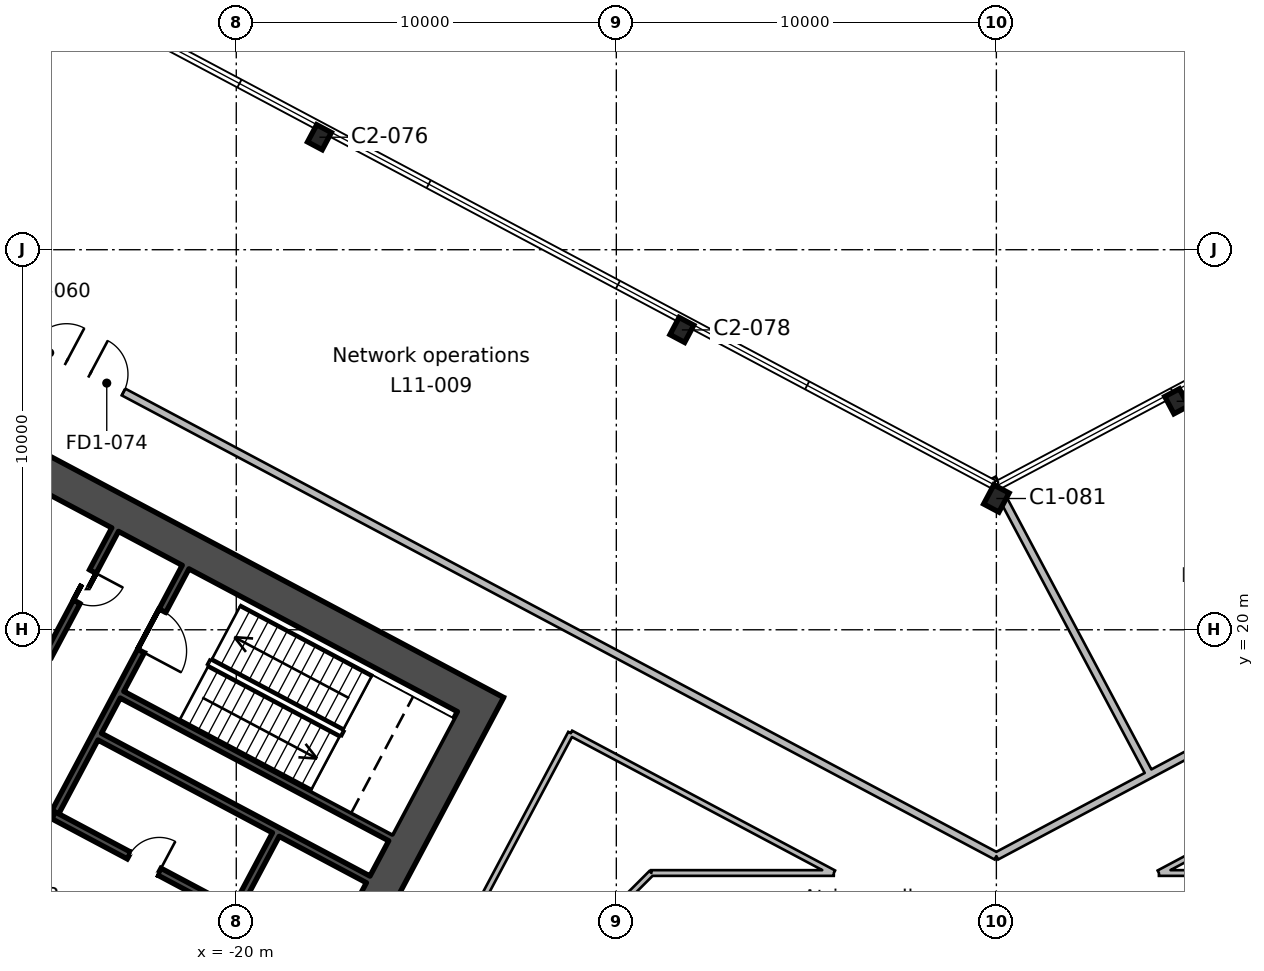
"""IFC4 building model, lengths in metres.
Left out: names, types, materials, properties, quantities, classifications, styles, units other than length and angle.
Written with IfcOpenShell. Run it as: python <this file> out.ifc"""

import sys

from ifc_helpers import new_model, si_unit, direction, frame, frame_2d, origin, origin_2d, place, context, subcontext, project, spatial, rectangle, i_section, extrude, element, fill, save


model = new_model("IFC4")
c1 = context("Model", 3, precision=1e-05, world=origin(), true_north=direction((0.0, 1.0)))
c2 = subcontext(c1, "Body", "Model", "MODEL_VIEW")
j1 = project(units=[si_unit("LENGTHUNIT", "METRE"), si_unit("PLANEANGLEUNIT", "RADIAN")], contexts=[c1])
p1 = place(None, origin())
s1 = spatial("IfcSite", under=j1, at=p1, CompositionType="ELEMENT")
p2 = place(p1, origin())
s2 = spatial("IfcBuilding", under=s1, at=p2, CompositionType="ELEMENT")
p3 = place(p2, frame((0.0, 0.0, 60.8)))
s3 = spatial("IfcBuildingStorey", under=s2, at=p3, CompositionType="ELEMENT", Elevation=60.8)
p4 = place(p3, frame((0.0, 23.454, 0.0), z_axis=(0.0, 0.0, 1.0), x_axis=(-0.882947592859, 0.469471562786, 0.0)))
e1 = element("IfcColumn", 1, at=p4, inside=s3, PredefinedType="COLUMN", context=c2, shape_type="SweptSolid", body=[
    extrude(i_section(OverallWidth=0.455, OverallDepth=0.569, WebThickness=0.078, FlangeThickness=0.125, FilletRadius=0.015, at=origin_2d()), origin(), (0.0, 0.0, 1.0), 5.4),
])
for number, where, z_axis, x_axis in (
    (2, (4.744, 26.012, 0.0), (0.0, 0.0, 1.0), (-0.883, -0.469, 0.0)),
    (3, (-8.275, 27.89, 0.0), (0.0, 0.0, 1.0), (-0.883, 0.469, 0.0)),
    (4, (-17.811, 32.96, 0.0), (0.0, 0.0, 1.0), (-0.883, 0.469, 0.0)),
):
    element("IfcColumn", number, at=place(p3, frame(where, z_axis=z_axis, x_axis=x_axis)), inside=s3, PredefinedType="COLUMN", context=c2, shape_type="SweptSolid", body=[
        extrude(i_section(OverallWidth=0.437, OverallDepth=0.513, WebThickness=0.061, FlangeThickness=0.097, FilletRadius=0.015, at=origin_2d()), origin(), (0.0, 0.0, 1.0), 5.4),
    ])
p5 = place(p3, frame((-13.362, 18.43, 0.0), z_axis=(0.0, 0.0, 1.0), x_axis=(-0.46947084998, -0.882947971864, 0.0)))
e5 = element("IfcWall", 5, at=p5, inside=s3, PredefinedType="SHEAR", context=c2, shape_type="SweptSolid", body=[
    extrude(rectangle(XDim=20.0, YDim=0.9, at=frame_2d((10.0, 0.0))), origin(), (0.0, 0.0, 1.0), 5.4),
])
p6 = place(p5, frame((7.0, 0.0, 0.0)))
e6 = element("IfcOpeningElement", 6, at=p6, cuts=e5, PredefinedType="OPENING", context=c2, shape_type="SweptSolid", body=[
    extrude(rectangle(XDim=2.4, YDim=2.4, at=frame_2d((1.2, 1.2))), frame((0.0, 0.46, 0.0), z_axis=(0.0, -1.0, 0.0), x_axis=(1.0, 0.0, 0.0)), (0.0, 0.0, 1.0), 0.92),
])
p7 = place(p3, frame((-13.97, 18.244, 0.0), z_axis=(0.0, 0.0, 1.0), x_axis=(-0.88294509198, 0.469476266226, 0.0)))
e7 = element("IfcWall", 7, at=p7, inside=s3, PredefinedType="SHEAR", context=c2, shape_type="SweptSolid", body=[
    extrude(rectangle(XDim=20.2, YDim=0.9, at=frame_2d((10.1, 0.0))), origin(), (0.0, 0.0, 1.0), 5.4),
])
p8 = place(p3, frame((-18.96, 14.611, 0.0), z_axis=(0.0, 0.0, 1.0), x_axis=(-0.4694473164, -0.882960484464, 0.0)))
e8 = element("IfcWall", 8, at=p8, inside=s3, PredefinedType="SHEAR", context=c2, shape_type="SweptSolid", body=[
    extrude(rectangle(XDim=2.2, YDim=0.2, at=frame_2d((1.1, 0.0))), origin(), (0.0, 0.0, 1.0), 5.4),
])
p9 = place(p3, frame((-21.333, 21.649, 0.0), z_axis=(0.0, 0.0, 1.0), x_axis=(-0.469494272526, -0.882935517501, 0.0)))
e9 = element("IfcWall", 9, at=p9, inside=s3, PredefinedType="SHEAR", context=c2, shape_type="SweptSolid", body=[
    extrude(rectangle(XDim=7.3, YDim=0.2, at=frame_2d((3.65, 0.0))), origin(), (0.0, 0.0, 1.0), 5.4),
])
p10 = place(p9, frame((1.3, 0.0, 0.0)))
e10 = element("IfcOpeningElement", 10, at=p10, cuts=e9, PredefinedType="OPENING", context=c2, shape_type="SweptSolid", body=[
    extrude(rectangle(XDim=1.2, YDim=2.1, at=frame_2d((0.6, 1.05))), frame((0.0, 0.11, 0.0), z_axis=(0.0, -1.0, 0.0), x_axis=(1.0, 0.0, 0.0)), (0.0, 0.0, 1.0), 0.22),
])
p11 = place(p3, frame((-23.188, 22.635, 0.0), z_axis=(0.0, 0.0, 1.0), x_axis=(-0.469454336211, -0.882956752176, 0.0)))
e11 = element("IfcWall", 11, at=p11, inside=s3, PredefinedType="SHEAR", context=c2, shape_type="SweptSolid", body=[
    extrude(rectangle(XDim=7.3, YDim=0.2, at=frame_2d((3.65, 0.0))), origin(), (0.0, 0.0, 1.0), 5.4),
])
p12 = place(p11, frame((1.25, 0.0, 0.0)))
e12 = element("IfcOpeningElement", 12, at=p12, cuts=e11, PredefinedType="OPENING", context=c2, shape_type="SweptSolid", body=[
    extrude(rectangle(XDim=0.9, YDim=2.1, at=frame_2d((0.45, 1.05))), frame((0.0, 0.11, 0.0), z_axis=(0.0, -1.0, 0.0), x_axis=(1.0, 0.0, 0.0)), (0.0, 0.0, 1.0), 0.22),
])
p13 = place(p11, frame((3.75, 0.0, 0.0)))
e13 = element("IfcOpeningElement", 13, at=p13, cuts=e11, PredefinedType="OPENING", context=c2, shape_type="SweptSolid", body=[
    extrude(rectangle(XDim=0.9, YDim=2.1, at=frame_2d((0.45, 1.05))), frame((0.0, 0.11, 0.0), z_axis=(0.0, -1.0, 0.0), x_axis=(1.0, 0.0, 0.0)), (0.0, 0.0, 1.0), 0.22),
])
p14 = place(p3, frame((-24.872, 19.68, 0.0), z_axis=(0.0, 0.0, 1.0), x_axis=(-0.882953967957, 0.469459572775, 0.0)))
e14 = element("IfcWall", 14, at=p14, inside=s3, PredefinedType="SOLIDWALL", context=c2, shape_type="SweptSolid", body=[
    extrude(rectangle(XDim=5.2, YDim=0.2, at=frame_2d((2.6, 0.0))), origin(), (0.0, 0.0, 1.0), 5.4),
])
p15 = place(p3, frame((-15.942, 14.536, 0.0), z_axis=(0.0, 0.0, 1.0), x_axis=(-0.882946947542, 0.469472776449, 0.0)))
e15 = element("IfcWall", 15, at=p15, inside=s3, PredefinedType="SHEAR", context=c2, shape_type="SweptSolid", body=[
    extrude(rectangle(XDim=8.0, YDim=0.2, at=frame_2d((4.0, 0.0))), origin(), (0.0, 0.0, 1.0), 5.4),
])
p16 = place(p3, frame((-16.529, 13.432, 0.0), z_axis=(0.0, 0.0, 1.0), x_axis=(-0.88295287151, 0.469461634952, 0.0)))
e16 = element("IfcWall", 16, at=p16, inside=s3, PredefinedType="SHEAR", context=c2, shape_type="SweptSolid", body=[
    extrude(rectangle(XDim=8.0, YDim=0.2, at=frame_2d((4.0, 0.0))), origin(), (0.0, 0.0, 1.0), 5.4),
])
p17 = place(p3, frame((-20.04, 12.581, 0.0), z_axis=(0.0, 0.0, 1.0), x_axis=(-0.882942972946, 0.469480251476, 0.0)))
e17 = element("IfcWall", 17, at=p17, inside=s3, PredefinedType="SHEAR", context=c2, shape_type="SweptSolid", body=[
    extrude(rectangle(XDim=5.4, YDim=0.2, at=frame_2d((2.7, 0.0))), origin(), (0.0, 0.0, 1.0), 5.4),
])
p18 = place(p17, frame((2.25, 0.0, 0.0)))
e18 = element("IfcOpeningElement", 18, at=p18, cuts=e17, PredefinedType="OPENING", context=c2, shape_type="SweptSolid", body=[
    extrude(rectangle(XDim=0.9, YDim=2.1, at=frame_2d((0.45, 1.05))), frame((0.0, 0.11, 0.0), z_axis=(0.0, -1.0, 0.0), x_axis=(1.0, 0.0, 0.0)), (0.0, 0.0, 1.0), 0.22),
])
p19 = place(p3, frame((-48.541, 39.854, 0.0), z_axis=(0.0, 0.0, 1.0), x_axis=(0.882945008423, -0.469476423372, 0.0)))
e19 = element("IfcWall", 19, at=p19, inside=s3, PredefinedType="PARTITIONING", context=c2, shape_type="SweptSolid", body=[
    extrude(rectangle(XDim=54.976, YDim=0.2, at=frame_2d((27.488, 0.0))), origin(), (0.0, 0.0, 1.0), 5.0),
])
p20 = place(p19, frame((27.965, 0.0, 0.0)))
e20 = element("IfcOpeningElement", 20, at=p20, cuts=e19, PredefinedType="OPENING", context=c2, shape_type="SweptSolid", body=[
    extrude(rectangle(XDim=1.0, YDim=2.1, at=frame_2d((0.5, 1.05))), frame((0.0, 0.11, 0.0), z_axis=(0.0, -1.0, 0.0), x_axis=(1.0, 0.0, 0.0)), (0.0, 0.0, 1.0), 0.22),
])
p21 = place(p19, frame((26.265, 0.0, 0.0)))
e21 = element("IfcOpeningElement", 21, at=p21, cuts=e19, PredefinedType="OPENING", context=c2, shape_type="SweptSolid", body=[
    extrude(rectangle(XDim=1.0, YDim=2.1, at=frame_2d((0.5, 1.05))), frame((0.0, 0.11, 0.0), z_axis=(0.0, -1.0, 0.0), x_axis=(1.0, 0.0, 0.0)), (0.0, 0.0, 1.0), 0.22),
])
p22 = place(p19, frame((15.365, 0.0, 0.0)))
e22 = element("IfcOpeningElement", 22, at=p22, cuts=e19, PredefinedType="OPENING", context=c2, shape_type="SweptSolid", body=[
    extrude(rectangle(XDim=1.0, YDim=2.1, at=frame_2d((0.5, 1.05))), frame((0.0, 0.11, 0.0), z_axis=(0.0, -1.0, 0.0), x_axis=(1.0, 0.0, 0.0)), (0.0, 0.0, 1.0), 0.22),
])
p23 = place(p3, frame((0.0, 14.044, 0.0), z_axis=(0.0, 0.0, 1.0), x_axis=(0.882943219941, 0.469479786955, 0.0)))
e23 = element("IfcWall", 23, at=p23, inside=s3, PredefinedType="PARTITIONING", context=c2, shape_type="SweptSolid", body=[
    extrude(rectangle(XDim=65.607, YDim=0.2, at=frame_2d((32.803, 0.0))), origin(), (0.0, 0.0, 1.0), 5.0),
])
p24 = place(p23, frame((35.55, 0.0, 0.0)))
e24 = element("IfcOpeningElement", 24, at=p24, cuts=e23, PredefinedType="OPENING", context=c2, shape_type="SweptSolid", body=[
    extrude(rectangle(XDim=1.0, YDim=2.1, at=frame_2d((0.5, 1.05))), frame((0.0, 0.11, 0.0), z_axis=(0.0, -1.0, 0.0), x_axis=(1.0, 0.0, 0.0)), (0.0, 0.0, 1.0), 0.22),
])
p25 = place(p23, frame((32.15, 0.0, 0.0)))
e25 = element("IfcOpeningElement", 25, at=p25, cuts=e23, PredefinedType="OPENING", context=c2, shape_type="SweptSolid", body=[
    extrude(rectangle(XDim=1.0, YDim=2.1, at=frame_2d((0.5, 1.05))), frame((0.0, 0.11, 0.0), z_axis=(0.0, -1.0, 0.0), x_axis=(1.0, 0.0, 0.0)), (0.0, 0.0, 1.0), 0.22),
])
p26 = place(p23, frame((29.75, 0.0, 0.0)))
e26 = element("IfcOpeningElement", 26, at=p26, cuts=e23, PredefinedType="OPENING", context=c2, shape_type="SweptSolid", body=[
    extrude(rectangle(XDim=1.0, YDim=2.1, at=frame_2d((0.5, 1.05))), frame((0.0, 0.11, 0.0), z_axis=(0.0, -1.0, 0.0), x_axis=(1.0, 0.0, 0.0)), (0.0, 0.0, 1.0), 0.22),
])
p27 = place(p23, frame((13.95, 0.0, 0.0)))
e27 = element("IfcOpeningElement", 27, at=p27, cuts=e23, PredefinedType="OPENING", context=c2, shape_type="SweptSolid", body=[
    extrude(rectangle(XDim=1.0, YDim=2.1, at=frame_2d((0.5, 1.05))), frame((0.0, 0.11, 0.0), z_axis=(0.0, -1.0, 0.0), x_axis=(1.0, 0.0, 0.0)), (0.0, 0.0, 1.0), 0.22),
])
p28 = place(p3, frame((-19.822, 34.55, 0.0), z_axis=(0.0, 0.0, 1.0), x_axis=(-0.469424316479, -0.882972712545, 0.0)))
e28 = element("IfcWall", 28, at=p28, inside=s3, PredefinedType="PARTITIONING", context=c2, shape_type="SweptSolid", body=[
    extrude(rectangle(XDim=8.8, YDim=0.2, at=frame_2d((4.4, 0.0))), origin(), (0.0, 0.0, 1.0), 5.0),
])
p29 = place(p3, frame((-0.105, 23.984, 0.0), z_axis=(0.0, 0.0, 1.0), x_axis=(0.469424872141, -0.882972417132, 0.0)))
e29 = element("IfcWall", 29, at=p29, inside=s3, PredefinedType="PARTITIONING", context=c2, shape_type="SweptSolid", body=[
    extrude(rectangle(XDim=8.826, YDim=0.2, at=frame_2d((4.413, 0.0))), origin(), (0.0, 0.0, 1.0), 5.0),
])
p30 = place(p3, frame((-20.588, -0.379, 0.0), z_axis=(0.0, 0.0, 1.0), x_axis=(0.469489882812, 0.882937851685, 0.0)))
e30 = element("IfcWall", 30, at=p30, inside=s3, PredefinedType="PARTITIONING", context=c2, shape_type="SweptSolid", body=[
    extrude(rectangle(XDim=20.0, YDim=0.15, at=frame_2d((10.0, 0.0))), origin(), (0.0, 0.0, 1.0), 5.0),
])
p31 = place(p30, frame((9.55, 0.0, 0.0)))
e31 = element("IfcOpeningElement", 31, at=p31, cuts=e30, PredefinedType="OPENING", context=c2, shape_type="SweptSolid", body=[
    extrude(rectangle(XDim=1.0, YDim=2.1, at=frame_2d((0.5, 1.05))), frame((0.0, 0.085, 0.0), z_axis=(0.0, -1.0, 0.0), x_axis=(1.0, 0.0, 0.0)), (0.0, 0.0, 1.0), 0.17),
])
p32 = place(p3, frame((-11.198, 17.28, 0.0), z_axis=(0.0, 0.0, 1.0), x_axis=(0.882946288452, -0.46947401601, 0.0)))
e32 = element("IfcWall", 32, at=p32, inside=s3, PredefinedType="PARTITIONING", context=c2, shape_type="SweptSolid", body=[
    extrude(rectangle(XDim=7.838, YDim=0.15, at=frame_2d((3.919, 0.0))), origin(), (0.0, 0.0, 1.0), 5.0),
])
p33 = place(p3, frame((-4.277, 13.6, 0.0), z_axis=(0.0, 0.0, 1.0), x_axis=(-1.0, 0.0, 0.0)))
e33 = element("IfcWall", 33, at=p33, inside=s3, PredefinedType="PARTITIONING", context=c2, shape_type="SweptSolid", body=[
    extrude(rectangle(XDim=4.8, YDim=0.15, at=frame_2d((2.4, 0.0))), origin(), (0.0, 0.0, 1.0), 5.0),
])
p34 = place(p3, frame((-9.077, 13.6, 0.0), z_axis=(0.0, 0.0, 1.0), x_axis=(-0.707106781187, -0.707106781187, 0.0)))
e34 = element("IfcWall", 34, at=p34, inside=s3, PredefinedType="PARTITIONING", context=c2, shape_type="SweptSolid", body=[
    extrude(rectangle(XDim=6.397, YDim=0.15, at=frame_2d((3.198, 0.0))), origin(), (0.0, 0.0, 1.0), 5.0),
])
p35 = place(p3, frame((7.667, 15.402, 0.0), z_axis=(0.0, 0.0, 1.0), x_axis=(-0.882994654303, -0.469383042378, 0.0)))
e35 = element("IfcWall", 35, at=p35, inside=s3, PredefinedType="PARTITIONING", context=c2, shape_type="SweptSolid", body=[
    extrude(rectangle(XDim=3.839, YDim=0.15, at=frame_2d((1.919, 0.0))), origin(), (0.0, 0.0, 1.0), 5.0),
])
p36 = place(p3, frame((4.277, 13.6, 0.0), z_axis=(0.0, 0.0, 1.0), x_axis=(1.0, 0.0, 0.0)))
e36 = element("IfcWall", 36, at=p36, inside=s3, PredefinedType="PARTITIONING", context=c2, shape_type="SweptSolid", body=[
    extrude(rectangle(XDim=4.348, YDim=0.15, at=frame_2d((2.174, 0.0))), origin(), (0.0, 0.0, 1.0), 5.0),
])
p37 = place(p10, origin())
e37 = element("IfcDoor", 37, at=p37, inside=s3, OperationType="SINGLE_SWING_RIGHT", PredefinedType="DOOR", context=c2, shape_type="SweptSolid", body=[
    extrude(rectangle(XDim=1.2, YDim=2.1, at=frame_2d((0.6, 1.05))), frame((0.0, 0.025, 0.0), z_axis=(0.0, -1.0, 0.0), x_axis=(1.0, 0.0, 0.0)), (0.0, 0.0, 1.0), 0.05),
])
fill(e10, e37)
p38 = place(p18, frame((0.9, 0.0, 0.0), z_axis=(0.0, 0.0, 1.0), x_axis=(-1.0, 0.0, 0.0)))
e38 = element("IfcDoor", 38, at=p38, inside=s3, OperationType="SINGLE_SWING_RIGHT", PredefinedType="DOOR", context=c2, shape_type="SweptSolid", body=[
    extrude(rectangle(XDim=0.9, YDim=2.1, at=frame_2d((0.45, 1.05))), frame((0.0, 0.025, 0.0), z_axis=(0.0, -1.0, 0.0), x_axis=(1.0, 0.0, 0.0)), (0.0, 0.0, 1.0), 0.05),
])
fill(e18, e38)
p39 = place(p12, origin())
e39 = element("IfcDoor", 39, at=p39, inside=s3, OperationType="SINGLE_SWING_LEFT", PredefinedType="DOOR", context=c2, shape_type="SweptSolid", body=[
    extrude(rectangle(XDim=0.9, YDim=2.1, at=frame_2d((0.45, 1.05))), frame((0.0, 0.025, 0.0), z_axis=(0.0, -1.0, 0.0), x_axis=(1.0, 0.0, 0.0)), (0.0, 0.0, 1.0), 0.05),
])
fill(e12, e39)
p40 = place(p20, origin())
e40 = element("IfcDoor", 40, at=p40, inside=s3, OperationType="SINGLE_SWING_LEFT", PredefinedType="DOOR", context=c2, shape_type="SweptSolid", body=[
    extrude(rectangle(XDim=1.0, YDim=2.1, at=frame_2d((0.5, 1.05))), frame((0.0, 0.025, 0.0), z_axis=(0.0, -1.0, 0.0), x_axis=(1.0, 0.0, 0.0)), (0.0, 0.0, 1.0), 0.05),
])
fill(e20, e40)
p41 = place(p21, origin())
e41 = element("IfcDoor", 41, at=p41, inside=s3, OperationType="SINGLE_SWING_RIGHT", PredefinedType="DOOR", context=c2, shape_type="SweptSolid", body=[
    extrude(rectangle(XDim=1.0, YDim=2.1, at=frame_2d((0.5, 1.05))), frame((0.0, 0.025, 0.0), z_axis=(0.0, -1.0, 0.0), x_axis=(1.0, 0.0, 0.0)), (0.0, 0.0, 1.0), 0.05),
])
fill(e21, e41)
save(model, sys.argv[1])
